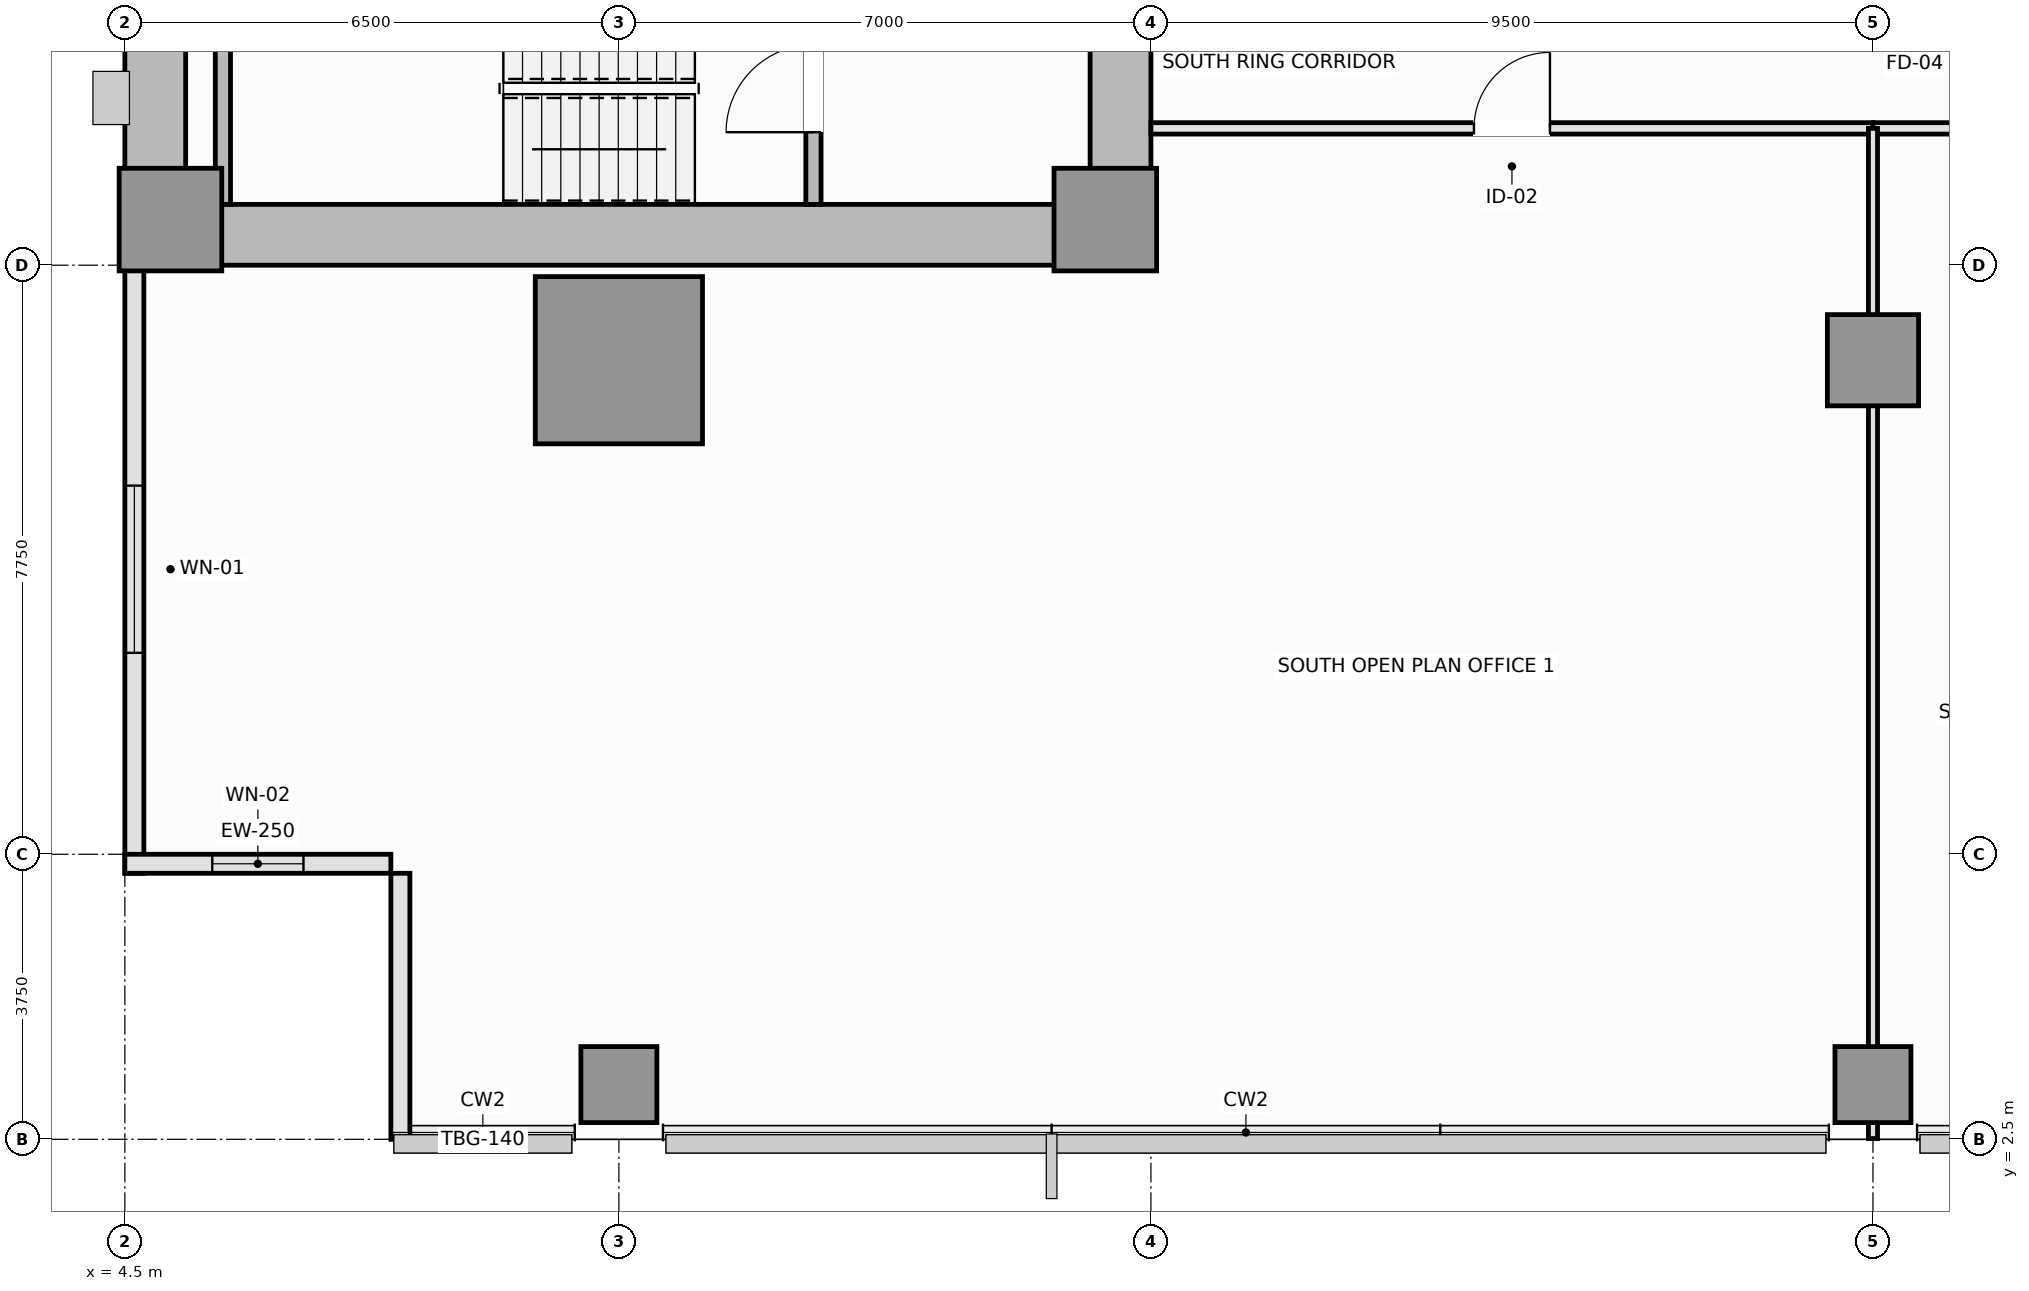
"""IFC4 building model, lengths in metres.
Left out: names, types, materials, properties, quantities, classifications, styles, units other than length and angle.
Written with IfcOpenShell. Run it as: python <this file> out.ifc"""

import sys

from ifc_helpers import new_model, si_unit, direction, frame, frame_2d, origin, origin_2d, place, context, subcontext, project, spatial, rectangle, extrude, element, fill, save


model = new_model("IFC4")
c1 = context("Model", 3, precision=1e-05, world=origin(), true_north=direction((0.0, 1.0)))
c2 = subcontext(c1, "Body", "Model", "MODEL_VIEW")
j1 = project(units=[si_unit("LENGTHUNIT", "METRE"), si_unit("PLANEANGLEUNIT", "RADIAN")], contexts=[c1])
p1 = place(None, origin())
s1 = spatial("IfcSite", under=j1, at=p1, CompositionType="ELEMENT")
p2 = place(p1, origin())
s2 = spatial("IfcBuilding", under=s1, at=p2, CompositionType="ELEMENT")
p3 = place(p2, frame((0.0, 0.0, 68.2)))
s3 = spatial("IfcBuildingStorey", under=s2, at=p3, CompositionType="ELEMENT", Elevation=68.2)
p4 = place(p3, frame((4.5, 14.4, 0.0), z_axis=(0.0, 0.0, 1.0), x_axis=(1.0, 0.0, 0.0)))
e1 = element("IfcWall", 1, at=p4, inside=s3, PredefinedType="SHEAR", context=c2, shape_type="SweptSolid", body=[
    extrude(rectangle(XDim=13.5, YDim=0.8, at=frame_2d((6.75, 0.0))), origin(), (0.0, 0.0, 1.0), 3.55),
])
p5 = place(p3, frame((4.9, 14.8, 0.0), z_axis=(0.0, 0.0, 1.0), x_axis=(0.0, 1.0, 0.0)))
e2 = element("IfcWall", 2, at=p5, inside=s3, PredefinedType="SHEAR", context=c2, shape_type="SweptSolid", body=[
    extrude(rectangle(XDim=20.9, YDim=0.8, at=frame_2d((10.45, 0.0))), origin(), (0.0, 0.0, 1.0), 3.55),
])
p6 = place(p3, frame((17.6, 14.8, 0.0), z_axis=(0.0, 0.0, 1.0), x_axis=(0.0, 1.0, 0.0)))
e3 = element("IfcWall", 3, at=p6, inside=s3, PredefinedType="SHEAR", context=c2, shape_type="SweptSolid", body=[
    extrude(rectangle(XDim=8.65, YDim=0.8, at=frame_2d((4.325, 0.0))), origin(), (0.0, 0.0, 1.0), 3.55),
])
p7 = place(p6, frame((4.1, 0.0, 0.0)))
e4 = element("IfcOpeningElement", 4, at=p7, cuts=e3, PredefinedType="OPENING", context=c2, shape_type="SweptSolid", body=[
    extrude(rectangle(XDim=1.1, YDim=2.15, at=frame_2d((0.55, 1.075))), frame((0.0, 0.41, 0.0), z_axis=(0.0, -1.0, 0.0), x_axis=(1.0, 0.0, 0.0)), (0.0, 0.0, 1.0), 0.82),
])
for number, where, z_axis, x_axis in (
    (5, (5.1, 14.6, 0.0), (0.0, 0.0, 1.0), (1.0, 0.0, 0.0)),
    (6, (17.4, 14.6, 0.0), (0.0, 0.0, 1.0), (1.0, 0.0, 0.0)),
):
    element("IfcColumn", number, at=place(p3, frame(where, z_axis=z_axis, x_axis=x_axis)), inside=s3, PredefinedType="PILASTER", context=c2, shape_type="SweptSolid", body=[
        extrude(rectangle(XDim=1.35, YDim=1.35, at=origin_2d()), origin(), (0.0, 0.0, 1.0), 3.55),
    ])
p8 = place(p3, frame((11.0, 12.75, 0.0), z_axis=(0.0, 0.0, 1.0), x_axis=(1.0, 0.0, 0.0)))
e7 = element("IfcColumn", 7, at=p8, inside=s3, PredefinedType="COLUMN", context=c2, shape_type="SweptSolid", body=[
    extrude(rectangle(XDim=2.2, YDim=2.2, at=origin_2d()), origin(), (0.0, 0.0, 1.0), 3.55),
])
p9 = place(p3, frame((27.5, 12.75, 0.0), z_axis=(0.0, 0.0, 1.0), x_axis=(1.0, 0.0, 0.0)))
e8 = element("IfcColumn", 8, at=p9, inside=s3, PredefinedType="COLUMN", context=c2, shape_type="SweptSolid", body=[
    extrude(rectangle(XDim=1.2, YDim=1.2, at=origin_2d()), origin(), (0.0, 0.0, 1.0), 3.55),
])
for number, where, z_axis, x_axis in (
    (9, (11.0, 3.22, 0.0), (0.0, 0.0, 1.0), (1.0, 0.0, 0.0)),
    (10, (27.5, 3.22, 0.0), (0.0, 0.0, 1.0), (1.0, 0.0, 0.0)),
):
    element("IfcColumn", number, at=place(p3, frame(where, z_axis=z_axis, x_axis=x_axis)), inside=s3, PredefinedType="COLUMN", context=c2, shape_type="SweptSolid", body=[
        extrude(rectangle(XDim=1.0, YDim=1.0, at=origin_2d()), origin(), (0.0, 0.0, 1.0), 3.55),
    ])
p10 = place(p3, frame((4.625, 14.0, 0.0), z_axis=(0.0, 0.0, 1.0), x_axis=(0.0, -1.0, 0.0)))
e11 = element("IfcWall", 11, at=p10, inside=s3, PredefinedType="SOLIDWALL", context=c2, shape_type="SweptSolid", body=[
    extrude(rectangle(XDim=8.0, YDim=0.25, at=frame_2d((4.0, 0.0))), origin(), (0.0, 0.0, 1.0), 3.37),
])
p11 = place(p10, frame((2.9, 0.0, 0.9)))
e12 = element("IfcOpeningElement", 12, at=p11, cuts=e11, PredefinedType="OPENING", context=c2, shape_type="SweptSolid", body=[
    extrude(rectangle(XDim=2.2, YDim=1.8, at=frame_2d((1.1, 0.9))), frame((0.0, 0.135, 0.0), z_axis=(0.0, -1.0, 0.0), x_axis=(1.0, 0.0, 0.0)), (0.0, 0.0, 1.0), 0.27),
])
p12 = place(p3, frame((4.5, 6.125, 0.0), z_axis=(0.0, 0.0, 1.0), x_axis=(1.0, 0.0, 0.0)))
e13 = element("IfcWall", 13, at=p12, inside=s3, PredefinedType="SOLIDWALL", context=c2, shape_type="SweptSolid", body=[
    extrude(rectangle(XDim=3.5, YDim=0.25, at=frame_2d((1.75, 0.0))), origin(), (0.0, 0.0, 1.0), 3.37),
])
p13 = place(p12, frame((1.15, 0.0, 0.9)))
e14 = element("IfcOpeningElement", 14, at=p13, cuts=e13, PredefinedType="OPENING", context=c2, shape_type="SweptSolid", body=[
    extrude(rectangle(XDim=1.2, YDim=1.8, at=frame_2d((0.6, 0.9))), frame((0.0, 0.135, 0.0), z_axis=(0.0, -1.0, 0.0), x_axis=(1.0, 0.0, 0.0)), (0.0, 0.0, 1.0), 0.27),
])
p14 = place(p3, frame((8.125, 6.0, 0.0), z_axis=(0.0, 0.0, 1.0), x_axis=(0.0, -1.0, 0.0)))
e15 = element("IfcWall", 15, at=p14, inside=s3, PredefinedType="SOLIDWALL", context=c2, shape_type="SweptSolid", body=[
    extrude(rectangle(XDim=3.5, YDim=0.25, at=frame_2d((1.75, 0.0))), origin(), (0.0, 0.0, 1.0), 3.37),
])
p15 = place(p3, frame((5.79, 14.8, 0.0), z_axis=(0.0, 0.0, 1.0), x_axis=(0.0, 1.0, 0.0)))
e16 = element("IfcWall", 16, at=p15, inside=s3, PredefinedType="SOLIDWALL", context=c2, shape_type="SweptSolid", body=[
    extrude(rectangle(XDim=3.05, YDim=0.2, at=frame_2d((1.525, 0.0))), origin(), (0.0, 0.0, 1.0), 3.55),
])
p16 = place(p3, frame((13.56, 14.8, 0.0), z_axis=(0.0, 0.0, 1.0), x_axis=(0.0, 1.0, 0.0)))
e17 = element("IfcWall", 17, at=p16, inside=s3, PredefinedType="SOLIDWALL", context=c2, shape_type="SweptSolid", body=[
    extrude(rectangle(XDim=3.05, YDim=0.2, at=frame_2d((1.525, 0.0))), origin(), (0.0, 0.0, 1.0), 3.55),
])
p17 = place(p16, frame((0.95, 0.0, 0.0)))
e18 = element("IfcOpeningElement", 18, at=p17, cuts=e17, PredefinedType="OPENING", context=c2, shape_type="SweptSolid", body=[
    extrude(rectangle(XDim=1.15, YDim=2.15, at=frame_2d((0.575, 1.075))), frame((0.0, 0.11, 0.0), z_axis=(0.0, -1.0, 0.0), x_axis=(1.0, 0.0, 0.0)), (0.0, 0.0, 1.0), 0.22),
])
p18 = place(p3, frame((18.0, 15.8, 0.0), z_axis=(0.0, 0.0, 1.0), x_axis=(1.0, 0.0, 0.0)))
e19 = element("IfcWall", 19, at=p18, inside=s3, PredefinedType="PARTITIONING", context=c2, shape_type="SweptSolid", body=[
    extrude(rectangle(XDim=9.5, YDim=0.15, at=frame_2d((4.75, 0.0))), origin(), (0.0, 0.0, 1.0), 3.37),
])
p19 = place(p18, frame((4.25, 0.0, 0.0)))
e20 = element("IfcOpeningElement", 20, at=p19, cuts=e19, PredefinedType="OPENING", context=c2, shape_type="SweptSolid", body=[
    extrude(rectangle(XDim=1.0, YDim=2.15, at=frame_2d((0.5, 1.075))), frame((0.0, 0.085, 0.0), z_axis=(0.0, -1.0, 0.0), x_axis=(1.0, 0.0, 0.0)), (0.0, 0.0, 1.0), 0.17),
])
p20 = place(p3, frame((27.5, 15.8, 0.0), z_axis=(0.0, 0.0, 1.0), x_axis=(1.0, 0.0, 0.0)))
e21 = element("IfcWall", 21, at=p20, inside=s3, PredefinedType="PARTITIONING", context=c2, shape_type="SweptSolid", body=[
    extrude(rectangle(XDim=4.3, YDim=0.15, at=frame_2d((2.15, 0.0))), origin(), (0.0, 0.0, 1.0), 3.37),
])
p21 = place(p20, frame((1.65, 0.0, 0.0)))
e22 = element("IfcOpeningElement", 22, at=p21, cuts=e21, PredefinedType="OPENING", context=c2, shape_type="SweptSolid", body=[
    extrude(rectangle(XDim=1.0, YDim=2.15, at=frame_2d((0.5, 1.075))), frame((0.0, 0.085, 0.0), z_axis=(0.0, -1.0, 0.0), x_axis=(1.0, 0.0, 0.0)), (0.0, 0.0, 1.0), 0.17),
])
p22 = place(p3, frame((27.5, 2.51, 0.0), z_axis=(0.0, 0.0, 1.0), x_axis=(0.0, 1.0, 0.0)))
e23 = element("IfcWall", 23, at=p22, inside=s3, PredefinedType="PARTITIONING", context=c2, shape_type="SweptSolid", body=[
    extrude(rectangle(XDim=13.29, YDim=0.12, at=frame_2d((6.645, 0.0))), origin(), (0.0, 0.0, 1.0), 2.82),
])
p23 = place(p11, origin())
e24 = element("IfcWindow", 24, at=p23, inside=s3, PartitioningType="SINGLE_PANEL", PredefinedType="WINDOW", context=c2, shape_type="SweptSolid", body=[
    extrude(rectangle(XDim=2.2, YDim=1.8, at=frame_2d((1.1, 0.9))), frame((0.0, 0.03, 0.0), z_axis=(0.0, -1.0, 0.0), x_axis=(1.0, 0.0, 0.0)), (0.0, 0.0, 1.0), 0.06),
])
fill(e12, e24)
p24 = place(p13, origin())
e25 = element("IfcWindow", 25, at=p24, inside=s3, PartitioningType="SINGLE_PANEL", PredefinedType="WINDOW", context=c2, shape_type="SweptSolid", body=[
    extrude(rectangle(XDim=1.2, YDim=1.8, at=frame_2d((0.6, 0.9))), frame((0.0, 0.03, 0.0), z_axis=(0.0, -1.0, 0.0), x_axis=(1.0, 0.0, 0.0)), (0.0, 0.0, 1.0), 0.06),
])
fill(e14, e25)
p25 = place(p17, origin())
e26 = element("IfcDoor", 26, at=p25, inside=s3, OperationType="SINGLE_SWING_LEFT", PredefinedType="DOOR", context=c2, shape_type="SweptSolid", body=[
    extrude(rectangle(XDim=1.15, YDim=2.15, at=frame_2d((0.575, 1.075))), frame((0.0, 0.025, 0.0), z_axis=(0.0, -1.0, 0.0), x_axis=(1.0, 0.0, 0.0)), (0.0, 0.0, 1.0), 0.05),
])
fill(e18, e26)
p26 = place(p19, origin())
e27 = element("IfcDoor", 27, at=p26, inside=s3, OperationType="SINGLE_SWING_RIGHT", PredefinedType="DOOR", context=c2, shape_type="SweptSolid", body=[
    extrude(rectangle(XDim=1.0, YDim=2.15, at=frame_2d((0.5, 1.075))), frame((0.0, 0.025, 0.0), z_axis=(0.0, -1.0, 0.0), x_axis=(1.0, 0.0, 0.0)), (0.0, 0.0, 1.0), 0.05),
])
fill(e20, e27)
save(model, sys.argv[1])
